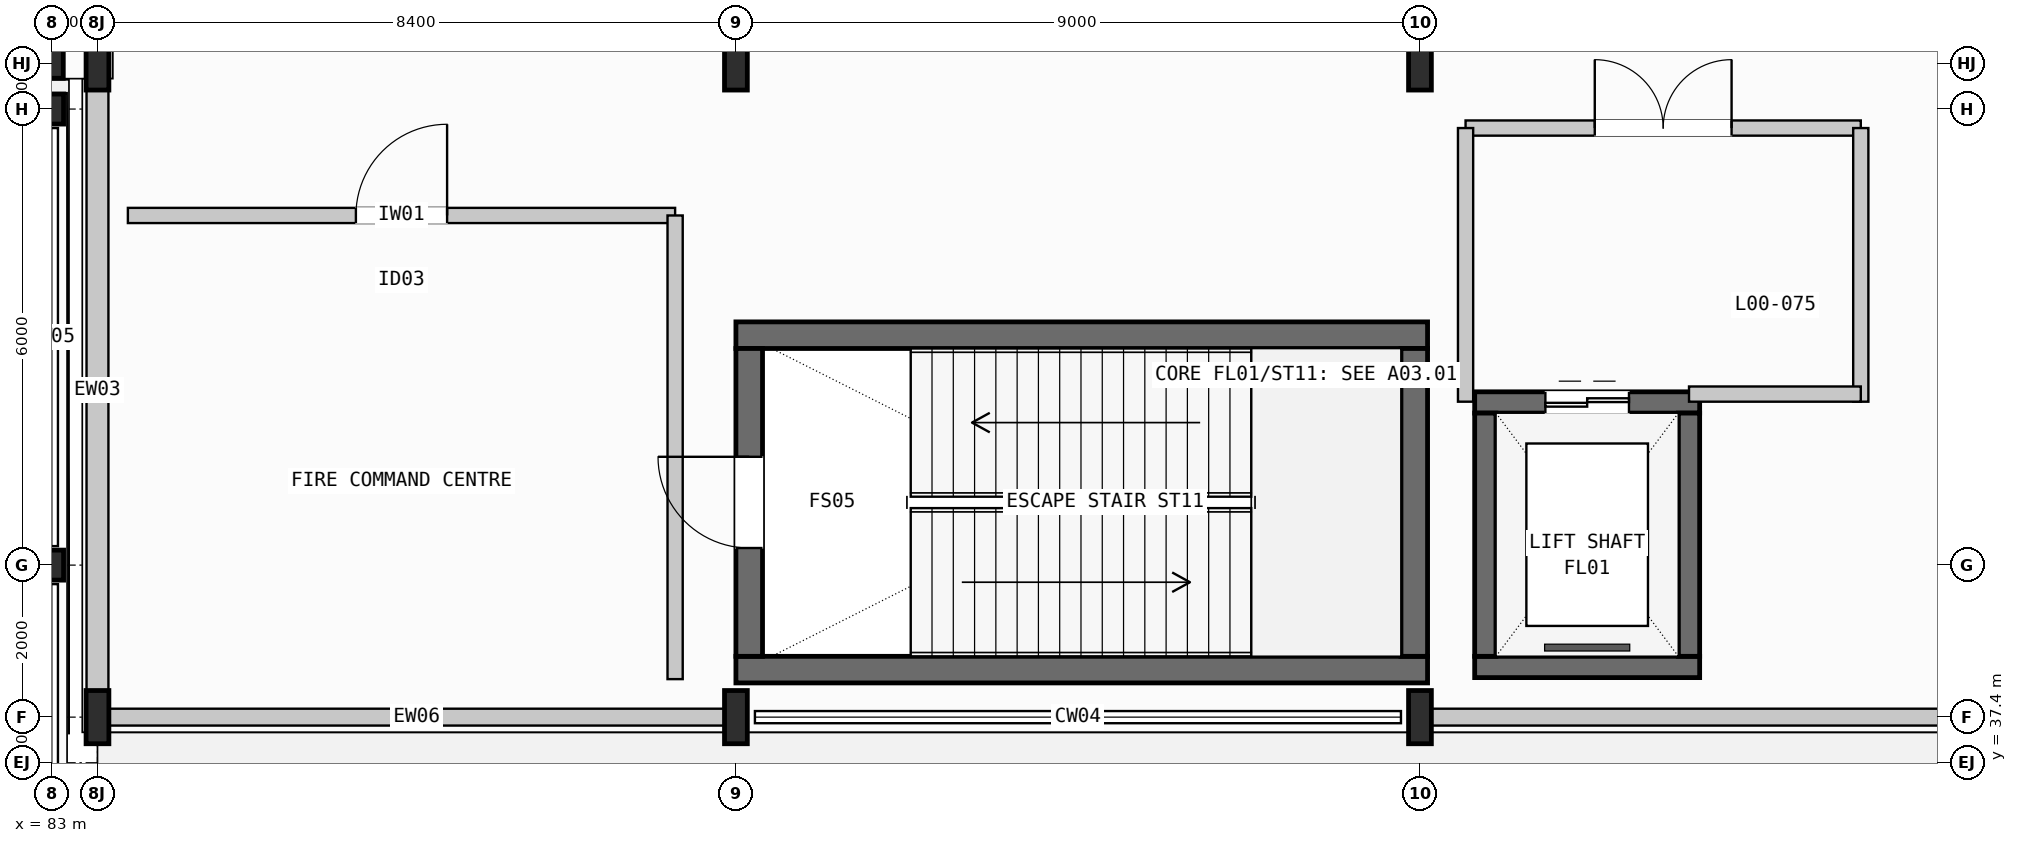
"""IFC4 building model, lengths in metres.
Left out: names, types, materials, properties, quantities, classifications, styles, units other than length and angle.
Written with IfcOpenShell. Run it as: python <this file> out.ifc"""

import sys

from ifc_helpers import new_model, si_unit, direction, frame, frame_2d, origin, origin_2d, place, context, subcontext, project, spatial, rectangle, i_section, extrude, element, fill, save


model = new_model("IFC4")
c1 = context("Model", 3, precision=1e-05, world=origin(), true_north=direction((0.0, 1.0)))
c2 = subcontext(c1, "Body", "Model", "MODEL_VIEW")
j1 = project(units=[si_unit("LENGTHUNIT", "METRE"), si_unit("PLANEANGLEUNIT", "RADIAN")], contexts=[c1])
p1 = place(None, origin())
s1 = spatial("IfcSite", under=j1, at=p1, CompositionType="ELEMENT")
p2 = place(p1, origin())
s2 = spatial("IfcBuilding", under=s1, at=p2, CompositionType="ELEMENT")
p3 = place(p2, origin())
s3 = spatial("IfcBuildingStorey", under=s2, at=p3, CompositionType="ELEMENT", Elevation=0.0)
for number, where, z_axis, x_axis in (
    (1, (83.0, 40.0, 0.0), (0.0, 0.0, 1.0), (1.0, 0.0, 0.0)),
    (2, (83.0, 46.0, 0.0), (0.0, 0.0, 1.0), (1.0, 0.0, 0.0)),
):
    element("IfcColumn", number, at=place(p3, frame(where, z_axis=z_axis, x_axis=x_axis)), inside=s3, PredefinedType="COLUMN", context=c2, shape_type="SweptSolid", body=[
        extrude(i_section(OverallWidth=0.308, OverallDepth=0.395, WebThickness=0.021, FlangeThickness=0.04, FilletRadius=0.027, at=origin_2d()), origin(), (0.0, 0.0, 1.0), 6.0),
    ])
p4 = place(p3, frame((83.0, 46.6, 0.0), z_axis=(0.0, 0.0, 1.0), x_axis=(1.0, 0.0, 0.0)))
e3 = element("IfcColumn", 3, at=p4, inside=s3, PredefinedType="COLUMN", context=c2, shape_type="SweptSolid", body=[
    extrude(i_section(OverallWidth=0.3, OverallDepth=0.39, WebThickness=0.011, FlangeThickness=0.019, FilletRadius=0.027, at=origin_2d()), origin(), (0.0, 0.0, 1.0), 6.0),
])
for number, where, z_axis, x_axis in (
    (4, (83.6, 38.0, 0.0), (0.0, 0.0, 1.0), (1.0, 0.0, 0.0)),
    (5, (83.6, 46.6, 0.0), (0.0, 0.0, 1.0), (1.0, 0.0, 0.0)),
    (6, (92.0, 38.0, 0.0), (0.0, 0.0, 1.0), (1.0, 0.0, 0.0)),
    (7, (92.0, 46.6, 0.0), (0.0, 0.0, 1.0), (1.0, 0.0, 0.0)),
    (8, (101.0, 38.0, 0.0), (0.0, 0.0, 1.0), (1.0, 0.0, 0.0)),
    (9, (101.0, 46.6, 0.0), (0.0, 0.0, 1.0), (1.0, 0.0, 0.0)),
):
    element("IfcColumn", number, at=place(p3, frame(where, z_axis=z_axis, x_axis=x_axis)), inside=s3, PredefinedType="COLUMN", context=c2, shape_type="SweptSolid", body=[
        extrude(i_section(OverallWidth=0.3, OverallDepth=0.7, WebThickness=0.017, FlangeThickness=0.032, FilletRadius=0.027, at=origin_2d()), origin(), (0.0, 0.0, 1.0), 6.0),
    ])
for number, where, z_axis, x_axis in (
    (10, (92.0, 38.625, 0.0), (0.0, 0.0, 1.0), (1.0, 0.0, 0.0)),
    (11, (92.0, 43.025, 0.0), (0.0, 0.0, 1.0), (1.0, 0.0, 0.0)),
):
    element("IfcWall", number, at=place(p3, frame(where, z_axis=z_axis, x_axis=x_axis)), inside=s3, PredefinedType="SHEAR", context=c2, shape_type="SweptSolid", body=[
        extrude(rectangle(XDim=9.1, YDim=0.35, at=frame_2d((4.55, 0.0))), origin(), (0.0, 0.0, 1.0), 6.0),
    ])
p5 = place(p3, frame((92.175, 38.8, 0.0), z_axis=(0.0, 0.0, 1.0), x_axis=(0.0, 1.0, 0.0)))
e12 = element("IfcWall", 12, at=p5, inside=s3, PredefinedType="SHEAR", context=c2, shape_type="SweptSolid", body=[
    extrude(rectangle(XDim=4.05, YDim=0.35, at=frame_2d((2.025, 0.0))), origin(), (0.0, 0.0, 1.0), 6.0),
])
p6 = place(p5, frame((1.425, 0.0, 0.0)))
e13 = element("IfcOpeningElement", 13, at=p6, cuts=e12, PredefinedType="OPENING", context=c2, shape_type="SweptSolid", body=[
    extrude(rectangle(XDim=1.2, YDim=2.2, at=frame_2d((0.6, 1.1))), frame((0.0, 0.185, 0.0), z_axis=(0.0, -1.0, 0.0), x_axis=(1.0, 0.0, 0.0)), (0.0, 0.0, 1.0), 0.37),
])
p7 = place(p3, frame((100.925, 38.8, 0.0), z_axis=(0.0, 0.0, 1.0), x_axis=(0.0, 1.0, 0.0)))
e14 = element("IfcWall", 14, at=p7, inside=s3, PredefinedType="SHEAR", context=c2, shape_type="SweptSolid", body=[
    extrude(rectangle(XDim=4.05, YDim=0.35, at=frame_2d((2.025, 0.0))), origin(), (0.0, 0.0, 1.0), 6.0),
])
p8 = place(p3, frame((101.72, 38.66, 0.0), z_axis=(0.0, 0.0, 1.0), x_axis=(1.0, 0.0, 0.0)))
e15 = element("IfcWall", 15, at=p8, inside=s3, PredefinedType="SHEAR", context=c2, shape_type="SweptSolid", body=[
    extrude(rectangle(XDim=2.96, YDim=0.28, at=frame_2d((1.48, 0.0))), origin(), (0.0, 0.0, 1.0), 6.0),
])
p9 = place(p3, frame((101.72, 42.14, 0.0), z_axis=(0.0, 0.0, 1.0), x_axis=(1.0, 0.0, 0.0)))
e16 = element("IfcWall", 16, at=p9, inside=s3, PredefinedType="SHEAR", context=c2, shape_type="SweptSolid", body=[
    extrude(rectangle(XDim=2.96, YDim=0.28, at=frame_2d((1.48, 0.0))), origin(), (0.0, 0.0, 1.0), 6.0),
])
p10 = place(p9, frame((0.93, 0.0, 0.0)))
e17 = element("IfcOpeningElement", 17, at=p10, cuts=e16, PredefinedType="OPENING", context=c2, shape_type="SweptSolid", body=[
    extrude(rectangle(XDim=1.1, YDim=2.15, at=frame_2d((0.55, 1.075))), frame((0.0, 0.15, 0.0), z_axis=(0.0, -1.0, 0.0), x_axis=(1.0, 0.0, 0.0)), (0.0, 0.0, 1.0), 0.3),
])
for number, where, z_axis, x_axis in (
    (18, (101.86, 38.8, 0.0), (0.0, 0.0, 1.0), (0.0, 1.0, 0.0)),
    (19, (104.54, 38.8, 0.0), (0.0, 0.0, 1.0), (0.0, 1.0, 0.0)),
):
    element("IfcWall", number, at=place(p3, frame(where, z_axis=z_axis, x_axis=x_axis)), inside=s3, PredefinedType="SHEAR", context=c2, shape_type="SweptSolid", body=[
        extrude(rectangle(XDim=3.2, YDim=0.28, at=frame_2d((1.6, 0.0))), origin(), (0.0, 0.0, 1.0), 6.0),
    ])
p11 = place(p3, frame((83.746, 38.0, 0.0), z_axis=(0.0, 0.0, 1.0), x_axis=(1.0, 0.0, 0.0)))
e20 = element("IfcWall", 20, at=p11, inside=s3, PredefinedType="STANDARD", context=c2, shape_type="SweptSolid", body=[
    extrude(rectangle(XDim=8.108, YDim=0.222, at=frame_2d((4.054, 0.0))), origin(), (0.0, 0.0, 1.0), 5.098),
])
p12 = place(p3, frame((101.146, 38.0, 0.0), z_axis=(0.0, 0.0, 1.0), x_axis=(1.0, 0.0, 0.0)))
e21 = element("IfcWall", 21, at=p12, inside=s3, PredefinedType="STANDARD", context=c2, shape_type="SweptSolid", body=[
    extrude(rectangle(XDim=8.708, YDim=0.222, at=frame_2d((4.354, 0.0))), origin(), (0.0, 0.0, 1.0), 5.098),
])
p13 = place(p3, frame((83.6, 38.346, 0.0), z_axis=(0.0, 0.0, 1.0), x_axis=(0.0, 1.0, 0.0)))
e22 = element("IfcWall", 22, at=p13, inside=s3, PredefinedType="STANDARD", context=c2, shape_type="SweptSolid", body=[
    extrude(rectangle(XDim=7.908, YDim=0.288, at=frame_2d((3.954, 0.0))), origin(), (0.0, 0.0, 1.0), 5.1),
])
p14 = place(p3, frame((101.6, 45.75, 0.0), z_axis=(0.0, 0.0, 1.0), x_axis=(1.0, 0.0, 0.0)))
e23 = element("IfcWall", 23, at=p14, inside=s3, PredefinedType="PARTITIONING", context=c2, shape_type="SweptSolid", body=[
    extrude(rectangle(XDim=5.2, YDim=0.2, at=frame_2d((2.6, 0.0))), origin(), (0.0, 0.0, 1.0), 4.0),
])
p15 = place(p14, frame((1.7, 0.0, 0.0)))
e24 = element("IfcOpeningElement", 24, at=p15, cuts=e23, PredefinedType="OPENING", context=c2, shape_type="SweptSolid", body=[
    extrude(rectangle(XDim=1.8, YDim=2.2, at=frame_2d((0.9, 1.1))), frame((0.0, 0.11, 0.0), z_axis=(0.0, -1.0, 0.0), x_axis=(1.0, 0.0, 0.0)), (0.0, 0.0, 1.0), 0.22),
])
for number, where, z_axis, x_axis in (
    (25, (101.6, 42.15, 0.0), (0.0, 0.0, 1.0), (0.0, 1.0, 0.0)),
    (26, (106.8, 42.15, 0.0), (0.0, 0.0, 1.0), (0.0, 1.0, 0.0)),
):
    element("IfcWall", number, at=place(p3, frame(where, z_axis=z_axis, x_axis=x_axis)), inside=s3, PredefinedType="PARTITIONING", context=c2, shape_type="SweptSolid", body=[
        extrude(rectangle(XDim=3.6, YDim=0.2, at=frame_2d((1.8, 0.0))), origin(), (0.0, 0.0, 1.0), 4.0),
    ])
p16 = place(p3, frame((104.54, 42.25, 0.0), z_axis=(0.0, 0.0, 1.0), x_axis=(1.0, 0.0, 0.0)))
e27 = element("IfcWall", 27, at=p16, inside=s3, PredefinedType="PARTITIONING", context=c2, shape_type="SweptSolid", body=[
    extrude(rectangle(XDim=2.26, YDim=0.2, at=frame_2d((1.13, 0.0))), origin(), (0.0, 0.0, 1.0), 4.0),
])
p17 = place(p3, frame((84.0, 44.6, 0.0), z_axis=(0.0, 0.0, 1.0), x_axis=(1.0, 0.0, 0.0)))
e28 = element("IfcWall", 28, at=p17, inside=s3, PredefinedType="PARTITIONING", context=c2, shape_type="SweptSolid", body=[
    extrude(rectangle(XDim=7.2, YDim=0.2, at=frame_2d((3.6, 0.0))), origin(), (0.0, 0.0, 1.0), 4.9),
])
p18 = place(p17, frame((3.0, 0.0, 0.0)))
e29 = element("IfcOpeningElement", 29, at=p18, cuts=e28, PredefinedType="OPENING", context=c2, shape_type="SweptSolid", body=[
    extrude(rectangle(XDim=1.2, YDim=2.2, at=frame_2d((0.6, 1.1))), frame((0.0, 0.11, 0.0), z_axis=(0.0, -1.0, 0.0), x_axis=(1.0, 0.0, 0.0)), (0.0, 0.0, 1.0), 0.22),
])
p19 = place(p3, frame((91.2, 38.5, 0.0), z_axis=(0.0, 0.0, 1.0), x_axis=(0.0, 1.0, 0.0)))
e30 = element("IfcWall", 30, at=p19, inside=s3, PredefinedType="PARTITIONING", context=c2, shape_type="SweptSolid", body=[
    extrude(rectangle(XDim=6.1, YDim=0.2, at=frame_2d((3.05, 0.0))), origin(), (0.0, 0.0, 1.0), 4.9),
])
p20 = place(p6, origin())
e31 = element("IfcDoor", 31, at=p20, inside=s3, OperationType="SINGLE_SWING_RIGHT", PredefinedType="DOOR", context=c2, shape_type="SweptSolid", body=[
    extrude(rectangle(XDim=1.2, YDim=2.2, at=frame_2d((0.6, 1.1))), frame((0.0, 0.025, 0.0), z_axis=(0.0, -1.0, 0.0), x_axis=(1.0, 0.0, 0.0)), (0.0, 0.0, 1.0), 0.05),
])
fill(e13, e31)
p21 = place(p10, origin())
e32 = element("IfcDoor", 32, at=p21, inside=s3, OperationType="DOUBLE_DOOR_SLIDING", PredefinedType="DOOR", context=c2, shape_type="SweptSolid", body=[
    extrude(rectangle(XDim=1.1, YDim=2.15, at=frame_2d((0.55, 1.075))), frame((0.0, 0.025, 0.0), z_axis=(0.0, -1.0, 0.0), x_axis=(1.0, 0.0, 0.0)), (0.0, 0.0, 1.0), 0.05),
])
fill(e17, e32)
p22 = place(p15, origin())
e33 = element("IfcDoor", 33, at=p22, inside=s3, OperationType="DOUBLE_DOOR_SINGLE_SWING", PredefinedType="DOOR", context=c2, shape_type="SweptSolid", body=[
    extrude(rectangle(XDim=1.8, YDim=2.2, at=frame_2d((0.9, 1.1))), frame((0.0, 0.025, 0.0), z_axis=(0.0, -1.0, 0.0), x_axis=(1.0, 0.0, 0.0)), (0.0, 0.0, 1.0), 0.05),
])
fill(e24, e33)
p23 = place(p18, origin())
e34 = element("IfcDoor", 34, at=p23, inside=s3, OperationType="SINGLE_SWING_RIGHT", PredefinedType="DOOR", context=c2, shape_type="SweptSolid", body=[
    extrude(rectangle(XDim=1.2, YDim=2.2, at=frame_2d((0.6, 1.1))), frame((0.0, 0.025, 0.0), z_axis=(0.0, -1.0, 0.0), x_axis=(1.0, 0.0, 0.0)), (0.0, 0.0, 1.0), 0.05),
])
fill(e29, e34)
save(model, sys.argv[1])
